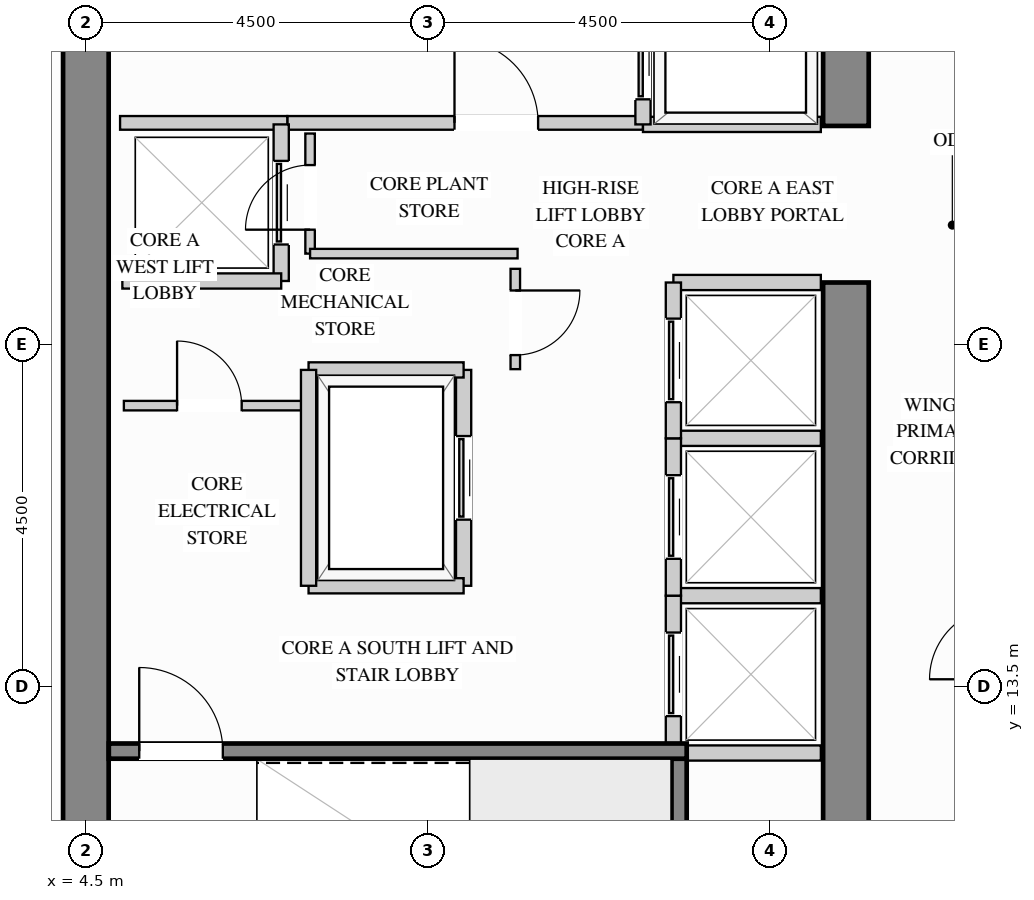
"""IFC4 building model, lengths in metres.
Left out: names, types, materials, properties, quantities, classifications, styles, units other than length and angle.
Written with IfcOpenShell. Run it as: python <this file> out.ifc"""

import sys

from ifc_helpers import new_model, si_unit, direction, frame, frame_2d, origin, place, context, subcontext, project, spatial, rectangle, extrude, source, transform, mapped, element, fill, save


model = new_model("IFC4")
c1 = context("Model", 3, precision=1e-05, world=origin(), true_north=direction((0.0, 1.0)))
c2 = subcontext(c1, "Body", "Model", "MODEL_VIEW")
j1 = project(units=[si_unit("LENGTHUNIT", "METRE"), si_unit("PLANEANGLEUNIT", "RADIAN")], contexts=[c1])
p1 = place(None, origin())
s1 = spatial("IfcSite", under=j1, at=p1, CompositionType="ELEMENT")
p2 = place(p1, origin())
s2 = spatial("IfcBuilding", under=s1, at=p2, CompositionType="ELEMENT")
p3 = place(p2, frame((0.0, 0.0, 186.3)))
s3 = spatial("IfcBuildingStorey", under=s2, at=p3, CompositionType="ELEMENT", Elevation=186.3)
m1 = source(origin(), c2, "Body", "SweptSolid", [
    extrude(rectangle(XDim=10.02, YDim=0.6, at=frame_2d((5.01, 0.0))), origin(), (0.0, 0.0, 1.0), 3.4),
])
p4 = place(p3, frame((14.5, 8.8, 0.0), z_axis=(0.0, 0.0, 1.0), x_axis=(0.0, 1.0, 0.0)))
e1 = element("IfcWall", 1, at=p4, inside=s3, PredefinedType="SHEAR", context=c2, shape_type="MappedRepresentation", body=[
    mapped(m1, transform((0.0, 0.0, 0.0), x_axis=(1.0, 0.0, 0.0), y_axis=(0.0, 1.0, 0.0), z_axis=(0.0, 0.0, 1.0))),
])
m2 = source(origin(), c2, "Body", "SweptSolid", [
    extrude(rectangle(XDim=8.32, YDim=0.6, at=frame_2d((4.16, 0.0))), origin(), (0.0, 0.0, 1.0), 3.4),
])
p5 = place(p3, frame((14.5, 20.88, 0.0), z_axis=(0.0, 0.0, 1.0), x_axis=(0.0, 1.0, 0.0)))
e2 = element("IfcWall", 2, at=p5, inside=s3, PredefinedType="SHEAR", context=c2, shape_type="MappedRepresentation", body=[
    mapped(m2, transform((0.0, 0.0, 0.0), x_axis=(1.0, 0.0, 0.0), y_axis=(0.0, 1.0, 0.0), z_axis=(0.0, 0.0, 1.0))),
])
m3 = source(origin(), c2, "Body", "SweptSolid", [
    extrude(rectangle(XDim=20.4, YDim=0.6, at=frame_2d((10.2, 0.0))), origin(), (0.0, 0.0, 1.0), 3.4),
])
p6 = place(p3, frame((4.5, 8.8, 0.0), z_axis=(0.0, 0.0, 1.0), x_axis=(0.0, 1.0, 0.0)))
e3 = element("IfcWall", 3, at=p6, inside=s3, PredefinedType="SHEAR", context=c2, shape_type="MappedRepresentation", body=[
    mapped(m3, transform((0.0, 0.0, 0.0), x_axis=(1.0, 0.0, 0.0), y_axis=(0.0, 1.0, 0.0), z_axis=(0.0, 0.0, 1.0))),
])
p7 = place(p3, frame((7.15, 20.92, 0.0), z_axis=(0.0, 0.0, 1.0), x_axis=(1.0, 0.0, 0.0)))
e4 = element("IfcWall", 4, at=p7, inside=s3, PredefinedType="PARTITIONING", context=c2, shape_type="SweptSolid", body=[
    extrude(rectangle(XDim=4.68, YDim=0.18, at=frame_2d((2.34, 0.0))), origin(), (0.0, 0.0, 1.0), 3.385),
])
p8 = place(p7, frame((2.2, 0.0, 0.0)))
e5 = element("IfcOpeningElement", 5, at=p8, cuts=e4, PredefinedType="OPENING", context=c2, shape_type="SweptSolid", body=[
    extrude(rectangle(XDim=1.1, YDim=2.15, at=frame_2d((0.55, 1.075))), frame((0.0, 0.1, 0.0), z_axis=(0.0, -1.0, 0.0), x_axis=(1.0, 0.0, 0.0)), (0.0, 0.0, 1.0), 0.2),
])
m4 = source(origin(), c2, "Body", "SweptSolid", [
    extrude(rectangle(XDim=2.2, YDim=0.18, at=frame_2d((1.1, 0.0))), origin(), (0.0, 0.0, 1.0), 3.385),
])
p9 = place(p3, frame((4.95, 20.92, 0.0), z_axis=(0.0, 0.0, 1.0), x_axis=(1.0, 0.0, 0.0)))
e6 = element("IfcWall", 6, at=p9, inside=s3, PredefinedType="PARTITIONING", context=c2, shape_type="MappedRepresentation", body=[
    mapped(m4, transform((0.0, 0.0, 0.0), x_axis=(1.0, 0.0, 0.0), y_axis=(0.0, 1.0, 0.0), z_axis=(0.0, 0.0, 1.0))),
])
p10 = place(p3, frame((10.15, 17.68, 0.0), z_axis=(0.0, 0.0, 1.0), x_axis=(0.0, 1.0, 0.0)))
e7 = element("IfcWall", 7, at=p10, inside=s3, PredefinedType="PARTITIONING", context=c2, shape_type="SweptSolid", body=[
    extrude(rectangle(XDim=1.32, YDim=0.125, at=frame_2d((0.66, 0.0))), origin(), (0.0, 0.0, 1.0), 3.385),
])
p11 = place(p10, frame((0.185, 0.0, 0.0)))
e8 = element("IfcOpeningElement", 8, at=p11, cuts=e7, PredefinedType="OPENING", context=c2, shape_type="SweptSolid", body=[
    extrude(rectangle(XDim=0.85, YDim=2.1, at=frame_2d((0.425, 1.05))), frame((0.0, 0.073, 0.0), z_axis=(0.0, -1.0, 0.0), x_axis=(1.0, 0.0, 0.0)), (0.0, 0.0, 1.0), 0.145),
])
p12 = place(p3, frame((7.45, 19.2, 0.0), z_axis=(0.0, 0.0, 1.0), x_axis=(0.0, 1.0, 0.0)))
e9 = element("IfcWall", 9, at=p12, inside=s3, PredefinedType="PARTITIONING", context=c2, shape_type="SweptSolid", body=[
    extrude(rectangle(XDim=1.58, YDim=0.125, at=frame_2d((0.79, 0.0))), origin(), (0.0, 0.0, 1.0), 3.385),
])
p13 = place(p12, frame((0.315, 0.0, 0.0)))
e10 = element("IfcOpeningElement", 10, at=p13, cuts=e9, PredefinedType="OPENING", context=c2, shape_type="SweptSolid", body=[
    extrude(rectangle(XDim=0.85, YDim=2.1, at=frame_2d((0.425, 1.05))), frame((0.0, 0.073, 0.0), z_axis=(0.0, -1.0, 0.0), x_axis=(1.0, 0.0, 0.0)), (0.0, 0.0, 1.0), 0.145),
])
m5 = source(origin(), c2, "Body", "SweptSolid", [
    extrude(rectangle(XDim=2.73, YDim=0.125, at=frame_2d((1.365, 0.0))), origin(), (0.0, 0.0, 1.0), 3.385),
])
p14 = place(p3, frame((7.45, 19.2, 0.0), z_axis=(0.0, 0.0, 1.0), x_axis=(1.0, 0.0, 0.0)))
e11 = element("IfcWall", 11, at=p14, inside=s3, PredefinedType="PARTITIONING", context=c2, shape_type="MappedRepresentation", body=[
    mapped(m5, transform((0.0, 0.0, 0.0), x_axis=(1.0, 0.0, 0.0), y_axis=(0.0, 1.0, 0.0), z_axis=(0.0, 0.0, 1.0))),
])
p15 = place(p3, frame((5.0, 17.2, 0.0), z_axis=(0.0, 0.0, 1.0), x_axis=(1.0, 0.0, 0.0)))
e12 = element("IfcWall", 12, at=p15, inside=s3, PredefinedType="PARTITIONING", context=c2, shape_type="SweptSolid", body=[
    extrude(rectangle(XDim=2.4, YDim=0.125, at=frame_2d((1.2, 0.0))), origin(), (0.0, 0.0, 1.0), 3.385),
])
p16 = place(p15, frame((0.7, 0.0, 0.0)))
e13 = element("IfcOpeningElement", 13, at=p16, cuts=e12, PredefinedType="OPENING", context=c2, shape_type="SweptSolid", body=[
    extrude(rectangle(XDim=0.85, YDim=2.1, at=frame_2d((0.425, 1.05))), frame((0.0, 0.073, 0.0), z_axis=(0.0, -1.0, 0.0), x_axis=(1.0, 0.0, 0.0)), (0.0, 0.0, 1.0), 0.145),
])
m6 = source(origin(), c2, "Body", "SweptSolid", [
    extrude(rectangle(XDim=2.34, YDim=0.2, at=frame_2d((1.17, 0.0))), origin(), (0.0, 0.0, 1.0), 3.385),
])
p17 = place(p3, frame((11.83, 20.9, 0.0), z_axis=(0.0, 0.0, 1.0), x_axis=(1.0, 0.0, 0.0)))
e14 = element("IfcWall", 14, at=p17, inside=s3, PredefinedType="PARTITIONING", context=c2, shape_type="MappedRepresentation", body=[
    mapped(m6, transform((0.0, 0.0, 0.0), x_axis=(1.0, 0.0, 0.0), y_axis=(0.0, 1.0, 0.0), z_axis=(0.0, 0.0, 1.0))),
])
p18 = place(p3, frame((11.83, 20.9, 0.0), z_axis=(0.0, 0.0, 1.0), x_axis=(0.0, 1.0, 0.0)))
e15 = element("IfcWall", 15, at=p18, inside=s3, PredefinedType="PARTITIONING", context=c2, shape_type="SweptSolid", body=[
    extrude(rectangle(XDim=1.76, YDim=0.2, at=frame_2d((0.88, 0.0))), origin(), (0.0, 0.0, 1.0), 3.385),
])
p19 = place(p18, frame((0.33, 0.0, 0.0)))
e16 = element("IfcOpeningElement", 16, at=p19, cuts=e15, PredefinedType="OPENING", context=c2, shape_type="SweptSolid", body=[
    extrude(rectangle(XDim=1.1, YDim=2.2, at=frame_2d((0.55, 1.1))), frame((0.0, 0.11, 0.0), z_axis=(0.0, -1.0, 0.0), x_axis=(1.0, 0.0, 0.0)), (0.0, 0.0, 1.0), 0.22),
])
m7 = source(origin(), c2, "Body", "SweptSolid", [
    extrude(rectangle(XDim=1.94, YDim=0.2, at=frame_2d((0.97, 0.0))), origin(), (0.0, 0.0, 1.0), 3.385),
])
for number, where, z_axis, x_axis in (
    (17, (12.23, 14.7, 0.0), (0.0, 0.0, 1.0), (1.0, 0.0, 0.0)),
    (18, (12.23, 12.63, 0.0), (0.0, 0.0, 1.0), (1.0, 0.0, 0.0)),
):
    element("IfcWall", number, at=place(p3, frame(where, z_axis=z_axis, x_axis=x_axis)), inside=s3, PredefinedType="PARTITIONING", context=c2, shape_type="MappedRepresentation", body=[
        mapped(m7, transform((0.0, 0.0, 0.0), x_axis=(1.0, 0.0, 0.0), y_axis=(0.0, 1.0, 0.0), z_axis=(0.0, 0.0, 1.0))),
    ])
p20 = place(p3, frame((12.23, 12.63, 0.0), z_axis=(0.0, 0.0, 1.0), x_axis=(0.0, 1.0, 0.0)))
e19 = element("IfcWall", 19, at=p20, inside=s3, PredefinedType="PARTITIONING", context=c2, shape_type="SweptSolid", body=[
    extrude(rectangle(XDim=2.07, YDim=0.2, at=frame_2d((1.035, 0.0))), origin(), (0.0, 0.0, 1.0), 3.385),
])
p21 = place(p20, frame((0.485, 0.0, 0.0)))
e20 = element("IfcOpeningElement", 20, at=p21, cuts=e19, PredefinedType="OPENING", context=c2, shape_type="SweptSolid", body=[
    extrude(rectangle(XDim=1.1, YDim=2.2, at=frame_2d((0.55, 1.1))), frame((0.0, 0.11, 0.0), z_axis=(0.0, -1.0, 0.0), x_axis=(1.0, 0.0, 0.0)), (0.0, 0.0, 1.0), 0.22),
])
p22 = place(p3, frame((12.23, 16.77, 0.0), z_axis=(0.0, 0.0, 1.0), x_axis=(1.0, 0.0, 0.0)))
e21 = element("IfcWall", 21, at=p22, inside=s3, PredefinedType="PARTITIONING", context=c2, shape_type="MappedRepresentation", body=[
    mapped(m7, transform((0.0, 0.0, 0.0), x_axis=(1.0, 0.0, 0.0), y_axis=(0.0, 1.0, 0.0), z_axis=(0.0, 0.0, 1.0))),
])
p23 = place(p3, frame((12.23, 14.7, 0.0), z_axis=(0.0, 0.0, 1.0), x_axis=(0.0, 1.0, 0.0)))
e22 = element("IfcWall", 22, at=p23, inside=s3, PredefinedType="PARTITIONING", context=c2, shape_type="SweptSolid", body=[
    extrude(rectangle(XDim=2.07, YDim=0.2, at=frame_2d((1.035, 0.0))), origin(), (0.0, 0.0, 1.0), 3.385),
])
p24 = place(p23, frame((0.485, 0.0, 0.0)))
e23 = element("IfcOpeningElement", 23, at=p24, cuts=e22, PredefinedType="OPENING", context=c2, shape_type="SweptSolid", body=[
    extrude(rectangle(XDim=1.1, YDim=2.2, at=frame_2d((0.55, 1.1))), frame((0.0, 0.11, 0.0), z_axis=(0.0, -1.0, 0.0), x_axis=(1.0, 0.0, 0.0)), (0.0, 0.0, 1.0), 0.22),
])
p25 = place(p3, frame((12.23, 18.82, 0.0), z_axis=(0.0, 0.0, 1.0), x_axis=(1.0, 0.0, 0.0)))
e24 = element("IfcWall", 24, at=p25, inside=s3, PredefinedType="PARTITIONING", context=c2, shape_type="MappedRepresentation", body=[
    mapped(m7, transform((0.0, 0.0, 0.0), x_axis=(1.0, 0.0, 0.0), y_axis=(0.0, 1.0, 0.0), z_axis=(0.0, 0.0, 1.0))),
])
p26 = place(p3, frame((12.23, 16.77, 0.0), z_axis=(0.0, 0.0, 1.0), x_axis=(0.0, 1.0, 0.0)))
e25 = element("IfcWall", 25, at=p26, inside=s3, PredefinedType="PARTITIONING", context=c2, shape_type="SweptSolid", body=[
    extrude(rectangle(XDim=2.05, YDim=0.2, at=frame_2d((1.025, 0.0))), origin(), (0.0, 0.0, 1.0), 3.385),
])
p27 = place(p26, frame((0.475, 0.0, 0.0)))
e26 = element("IfcOpeningElement", 26, at=p27, cuts=e25, PredefinedType="OPENING", context=c2, shape_type="SweptSolid", body=[
    extrude(rectangle(XDim=1.1, YDim=2.2, at=frame_2d((0.55, 1.1))), frame((0.0, 0.11, 0.0), z_axis=(0.0, -1.0, 0.0), x_axis=(1.0, 0.0, 0.0)), (0.0, 0.0, 1.0), 0.22),
])
p28 = place(p3, frame((7.07, 18.84, 0.0), z_axis=(0.0, 0.0, 1.0), x_axis=(0.0, 1.0, 0.0)))
e27 = element("IfcWall", 27, at=p28, inside=s3, PredefinedType="PARTITIONING", context=c2, shape_type="SweptSolid", body=[
    extrude(rectangle(XDim=2.06, YDim=0.2, at=frame_2d((1.03, 0.0))), origin(), (0.0, 0.0, 1.0), 3.385),
])
p29 = place(p28, frame((0.48, 0.0, 0.0)))
e28 = element("IfcOpeningElement", 28, at=p29, cuts=e27, PredefinedType="OPENING", context=c2, shape_type="SweptSolid", body=[
    extrude(rectangle(XDim=1.1, YDim=2.2, at=frame_2d((0.55, 1.1))), frame((0.0, 0.11, 0.0), z_axis=(0.0, -1.0, 0.0), x_axis=(1.0, 0.0, 0.0)), (0.0, 0.0, 1.0), 0.22),
])
m8 = source(origin(), c2, "Body", "SweptSolid", [
    extrude(rectangle(XDim=2.09, YDim=0.2, at=frame_2d((1.045, 0.0))), origin(), (0.0, 0.0, 1.0), 3.385),
])
p30 = place(p3, frame((4.98, 18.84, 0.0), z_axis=(0.0, 0.0, 1.0), x_axis=(1.0, 0.0, 0.0)))
e29 = element("IfcWall", 29, at=p30, inside=s3, PredefinedType="PARTITIONING", context=c2, shape_type="MappedRepresentation", body=[
    mapped(m8, transform((0.0, 0.0, 0.0), x_axis=(1.0, 0.0, 0.0), y_axis=(0.0, 1.0, 0.0), z_axis=(0.0, 0.0, 1.0))),
])
p31 = place(p3, frame((9.47, 14.83, 0.0), z_axis=(0.0, 0.0, 1.0), x_axis=(0.0, 1.0, 0.0)))
e30 = element("IfcWall", 30, at=p31, inside=s3, PredefinedType="PARTITIONING", context=c2, shape_type="SweptSolid", body=[
    extrude(rectangle(XDim=2.84, YDim=0.2, at=frame_2d((1.42, 0.0))), origin(), (0.0, 0.0, 1.0), 3.385),
])
p32 = place(p31, frame((0.87, 0.0, 0.0)))
e31 = element("IfcOpeningElement", 31, at=p32, cuts=e30, PredefinedType="OPENING", context=c2, shape_type="SweptSolid", body=[
    extrude(rectangle(XDim=1.1, YDim=2.2, at=frame_2d((0.55, 1.1))), frame((0.0, 0.11, 0.0), z_axis=(0.0, -1.0, 0.0), x_axis=(1.0, 0.0, 0.0)), (0.0, 0.0, 1.0), 0.22),
])
m9 = source(origin(), c2, "Body", "SweptSolid", [
    extrude(rectangle(XDim=2.04, YDim=0.2, at=frame_2d((1.02, 0.0))), origin(), (0.0, 0.0, 1.0), 3.385),
])
for number, where, z_axis, x_axis in (
    (32, (7.43, 17.67, 0.0), (0.0, 0.0, 1.0), (1.0, 0.0, 0.0)),
    (33, (7.43, 14.83, 0.0), (0.0, 0.0, 1.0), (1.0, 0.0, 0.0)),
):
    element("IfcWall", number, at=place(p3, frame(where, z_axis=z_axis, x_axis=x_axis)), inside=s3, PredefinedType="PARTITIONING", context=c2, shape_type="MappedRepresentation", body=[
        mapped(m9, transform((0.0, 0.0, 0.0), x_axis=(1.0, 0.0, 0.0), y_axis=(0.0, 1.0, 0.0), z_axis=(0.0, 0.0, 1.0))),
    ])
m10 = source(origin(), c2, "Body", "SweptSolid", [
    extrude(rectangle(XDim=2.84, YDim=0.2, at=frame_2d((1.42, 0.0))), origin(), (0.0, 0.0, 1.0), 3.385),
])
p33 = place(p3, frame((7.43, 14.83, 0.0), z_axis=(0.0, 0.0, 1.0), x_axis=(0.0, 1.0, 0.0)))
e34 = element("IfcWall", 34, at=p33, inside=s3, PredefinedType="PARTITIONING", context=c2, shape_type="MappedRepresentation", body=[
    mapped(m10, transform((0.0, 0.0, 0.0), x_axis=(1.0, 0.0, 0.0), y_axis=(0.0, 1.0, 0.0), z_axis=(0.0, 0.0, 1.0))),
])
m11 = source(origin(), c2, "Body", "SweptSolid", [
    extrude(rectangle(XDim=3.753, YDim=0.2, at=frame_2d((1.876, 0.0))), origin(), (0.0, 0.0, 1.0), 3.4),
])
p34 = place(p3, frame((12.305, 8.802, 0.0), z_axis=(0.0, 0.0, 1.0), x_axis=(0.0, 1.0, 0.0)))
e35 = element("IfcWall", 35, at=p34, inside=s3, PredefinedType="SHEAR", context=c2, shape_type="MappedRepresentation", body=[
    mapped(m11, transform((0.0, 0.0, 0.0), x_axis=(1.0, 0.0, 0.0), y_axis=(0.0, 1.0, 0.0), z_axis=(0.0, 0.0, 1.0))),
])
p35 = place(p3, frame((4.802, 12.655, 0.0), z_axis=(0.0, 0.0, 1.0), x_axis=(1.0, 0.0, 0.0)))
e36 = element("IfcWall", 36, at=p35, inside=s3, PredefinedType="SHEAR", context=c2, shape_type="SweptSolid", body=[
    extrude(rectangle(XDim=7.603, YDim=0.2, at=frame_2d((3.802, 0.0))), origin(), (0.0, 0.0, 1.0), 3.4),
])
p36 = place(p35, frame((0.4, 0.0, 0.0)))
e37 = element("IfcOpeningElement", 37, at=p36, cuts=e36, PredefinedType="OPENING", context=c2, shape_type="SweptSolid", body=[
    extrude(rectangle(XDim=1.1, YDim=2.15, at=frame_2d((0.55, 1.075))), frame((0.0, 0.11, 0.0), z_axis=(0.0, -1.0, 0.0), x_axis=(1.0, 0.0, 0.0)), (0.0, 0.0, 1.0), 0.22),
])
m12 = source(origin(), c2, "Body", "SweptSolid", [
    extrude(rectangle(XDim=1.1, YDim=2.15, at=frame_2d((0.55, 1.075))), frame((0.0, 0.025, 0.0), z_axis=(0.0, -1.0, 0.0), x_axis=(1.0, 0.0, 0.0)), (0.0, 0.0, 1.0), 0.05),
])
p37 = place(p8, origin())
e38 = element("IfcDoor", 38, at=p37, inside=s3, OperationType="SINGLE_SWING_LEFT", PredefinedType="DOOR", context=c2, shape_type="MappedRepresentation", body=[
    mapped(m12, transform((0.0, 0.0, 0.0), x_axis=(1.0, 0.0, 0.0), y_axis=(0.0, 1.0, 0.0), z_axis=(0.0, 0.0, 1.0))),
])
fill(e5, e38)
m13 = source(origin(), c2, "Body", "SweptSolid", [
    extrude(rectangle(XDim=1.1, YDim=2.2, at=frame_2d((0.55, 1.1))), frame((0.0, 0.025, 0.0), z_axis=(0.0, -1.0, 0.0), x_axis=(1.0, 0.0, 0.0)), (0.0, 0.0, 1.0), 0.05),
])
p38 = place(p19, origin())
e39 = element("IfcDoor", 39, at=p38, inside=s3, OperationType="SLIDING_TO_LEFT", PredefinedType="DOOR", context=c2, shape_type="MappedRepresentation", body=[
    mapped(m13, transform((0.0, 0.0, 0.0), x_axis=(1.0, 0.0, 0.0), y_axis=(0.0, 1.0, 0.0), z_axis=(0.0, 0.0, 1.0))),
])
fill(e16, e39)
p39 = place(p21, origin())
e40 = element("IfcDoor", 40, at=p39, inside=s3, OperationType="SLIDING_TO_LEFT", PredefinedType="DOOR", context=c2, shape_type="MappedRepresentation", body=[
    mapped(m13, transform((0.0, 0.0, 0.0), x_axis=(1.0, 0.0, 0.0), y_axis=(0.0, 1.0, 0.0), z_axis=(0.0, 0.0, 1.0))),
])
fill(e20, e40)
p40 = place(p24, origin())
e41 = element("IfcDoor", 41, at=p40, inside=s3, OperationType="SLIDING_TO_LEFT", PredefinedType="DOOR", context=c2, shape_type="MappedRepresentation", body=[
    mapped(m13, transform((0.0, 0.0, 0.0), x_axis=(1.0, 0.0, 0.0), y_axis=(0.0, 1.0, 0.0), z_axis=(0.0, 0.0, 1.0))),
])
fill(e23, e41)
p41 = place(p27, origin())
e42 = element("IfcDoor", 42, at=p41, inside=s3, OperationType="SLIDING_TO_LEFT", PredefinedType="DOOR", context=c2, shape_type="MappedRepresentation", body=[
    mapped(m13, transform((0.0, 0.0, 0.0), x_axis=(1.0, 0.0, 0.0), y_axis=(0.0, 1.0, 0.0), z_axis=(0.0, 0.0, 1.0))),
])
fill(e26, e42)
p42 = place(p29, origin())
e43 = element("IfcDoor", 43, at=p42, inside=s3, OperationType="SLIDING_TO_LEFT", PredefinedType="DOOR", context=c2, shape_type="MappedRepresentation", body=[
    mapped(m13, transform((0.0, 0.0, 0.0), x_axis=(1.0, 0.0, 0.0), y_axis=(0.0, 1.0, 0.0), z_axis=(0.0, 0.0, 1.0))),
])
fill(e28, e43)
p43 = place(p32, origin())
e44 = element("IfcDoor", 44, at=p43, inside=s3, OperationType="SLIDING_TO_LEFT", PredefinedType="DOOR", context=c2, shape_type="MappedRepresentation", body=[
    mapped(m13, transform((0.0, 0.0, 0.0), x_axis=(1.0, 0.0, 0.0), y_axis=(0.0, 1.0, 0.0), z_axis=(0.0, 0.0, 1.0))),
])
fill(e31, e44)
m14 = source(origin(), c2, "Body", "SweptSolid", [
    extrude(rectangle(XDim=0.85, YDim=2.1, at=frame_2d((0.425, 1.05))), frame((0.0, 0.025, 0.0), z_axis=(0.0, -1.0, 0.0), x_axis=(1.0, 0.0, 0.0)), (0.0, 0.0, 1.0), 0.05),
])
p44 = place(p11, origin())
e45 = element("IfcDoor", 45, at=p44, inside=s3, OperationType="SINGLE_SWING_RIGHT", PredefinedType="DOOR", context=c2, shape_type="MappedRepresentation", body=[
    mapped(m14, transform((0.0, 0.0, 0.0), x_axis=(1.0, 0.0, 0.0), y_axis=(0.0, 1.0, 0.0), z_axis=(0.0, 0.0, 1.0))),
])
fill(e8, e45)
p45 = place(p16, origin())
e46 = element("IfcDoor", 46, at=p45, inside=s3, OperationType="SINGLE_SWING_LEFT", PredefinedType="DOOR", context=c2, shape_type="MappedRepresentation", body=[
    mapped(m14, transform((0.0, 0.0, 0.0), x_axis=(1.0, 0.0, 0.0), y_axis=(0.0, 1.0, 0.0), z_axis=(0.0, 0.0, 1.0))),
])
fill(e13, e46)
p46 = place(p13, origin())
e47 = element("IfcDoor", 47, at=p46, inside=s3, OperationType="SINGLE_SWING_LEFT", PredefinedType="DOOR", context=c2, shape_type="MappedRepresentation", body=[
    mapped(m14, transform((0.0, 0.0, 0.0), x_axis=(1.0, 0.0, 0.0), y_axis=(0.0, 1.0, 0.0), z_axis=(0.0, 0.0, 1.0))),
])
fill(e10, e47)
m15 = source(origin(), c2, "Body", "SweptSolid", [
    extrude(rectangle(XDim=1.1, YDim=2.15, at=frame_2d((0.55, 1.075))), frame((0.0, 0.025, 0.0), z_axis=(0.0, -1.0, 0.0), x_axis=(1.0, 0.0, 0.0)), (0.0, 0.0, 1.0), 0.05),
])
p47 = place(p36, origin())
e48 = element("IfcDoor", 48, at=p47, inside=s3, OperationType="SINGLE_SWING_LEFT", PredefinedType="DOOR", context=c2, shape_type="MappedRepresentation", body=[
    mapped(m15, transform((0.0, 0.0, 0.0), x_axis=(1.0, 0.0, 0.0), y_axis=(0.0, 1.0, 0.0), z_axis=(0.0, 0.0, 1.0))),
])
fill(e37, e48)
save(model, sys.argv[1])
